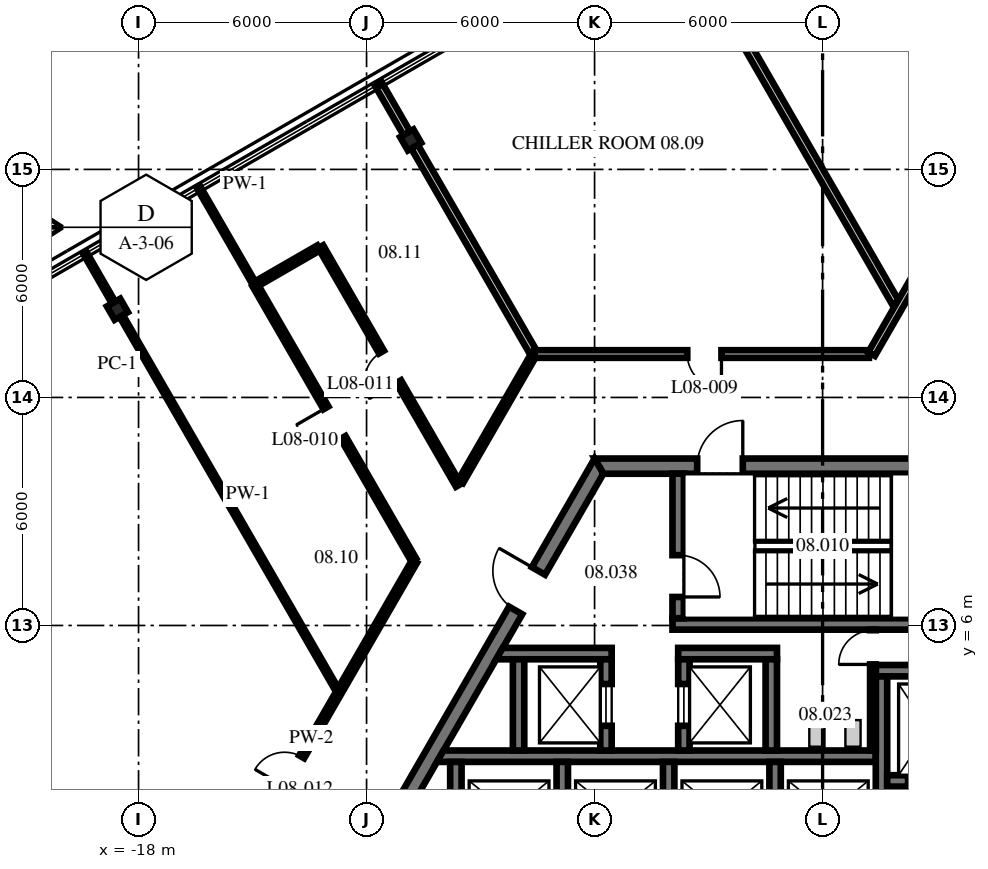
"""IFC4 building model, lengths in metres.
Left out: names, types, materials, properties, quantities, classifications, styles, units other than length and angle.
Written with IfcOpenShell. Run it as: python <this file> out.ifc"""

import sys

from ifc_helpers import new_model, si_unit, direction, frame, frame_2d, origin, origin_2d, place, context, subcontext, project, spatial, polyline, rectangle, i_section, outline, extrude, source, transform, mapped, element, fill, save


model = new_model("IFC4")
c1 = context("Model", 3, precision=1e-05, world=origin(), true_north=direction((0.0, 1.0)))
c2 = subcontext(c1, "Body", "Model", "MODEL_VIEW")
j1 = project(units=[si_unit("LENGTHUNIT", "METRE"), si_unit("PLANEANGLEUNIT", "RADIAN")], contexts=[c1])
p1 = place(None, origin())
s1 = spatial("IfcSite", under=j1, at=p1, CompositionType="ELEMENT")
p2 = place(p1, origin())
s2 = spatial("IfcBuilding", under=s1, at=p2, CompositionType="ELEMENT")
p3 = place(p2, frame((0.0, 0.0, 37.5)))
s3 = spatial("IfcBuildingStorey", under=s2, at=p3, CompositionType="ELEMENT", Elevation=37.5)
m1 = source(origin(), c2, "Body", "SweptSolid", [
    extrude(i_section(OverallWidth=0.404, OverallDepth=0.406, WebThickness=0.027, FlangeThickness=0.044, at=origin_2d()), origin(), (0.0, 0.0, 1.0), 4.3),
])
for number, where, z_axis, x_axis in (
    (1, (-10.84, 18.775, 0.0), (0.0, 0.0, 1.0), (-0.866, -0.5, 0.0)),
    (2, (-18.556, 14.32, 0.0), (0.0, 0.0, 1.0), (-0.866, -0.5, 0.0)),
):
    element("IfcColumn", number, at=place(p3, frame(where, z_axis=z_axis, x_axis=x_axis)), inside=s3, PredefinedType="COLUMN", context=c2, shape_type="MappedRepresentation", body=[
        mapped(m1, transform((0.0, 0.0, 0.0), scale=1.0)),
    ])
m2 = source(origin(), c2, "Body", "SweptSolid", [
    extrude(outline(polyline([(-0.115, -0.2), (11.885, -0.2), (11.654, 0.2), (0.115, 0.2), (-0.115, -0.2)])), origin(), (0.0, 0.0, 1.0), 4.1),
])
p4 = place(p3, frame((5.885, 10.192, 0.0), z_axis=(0.0, 0.0, 1.0), x_axis=(-1.0, 0.0, 0.0)))
e3 = element("IfcWall", 3, at=p4, inside=s3, PredefinedType="SHEAR", context=c2, shape_type="MappedRepresentation", body=[
    mapped(m2, transform((0.0, 0.0, 0.0), scale=1.0)),
])
p5 = place(p4, frame((7.985, 0.0, 0.0)))
e4 = element("IfcOpeningElement", 4, at=p5, cuts=e3, PredefinedType="OPENING", context=c2, shape_type="SweptSolid", body=[
    extrude(rectangle(XDim=1.2, YDim=2.1, at=frame_2d((0.6, 1.05))), frame((0.0, 0.21, 0.0), z_axis=(0.0, -1.0, 0.0), x_axis=(1.0, 0.0, 0.0)), (0.0, 0.0, 1.0), 0.42),
])
p6 = place(p3, frame((-5.885, 10.192, 0.0), z_axis=(0.0, 0.0, 1.0), x_axis=(-0.499996592174, -0.866027371285, 0.0)))
e5 = element("IfcWall", 5, at=p6, inside=s3, PredefinedType="SHEAR", context=c2, shape_type="MappedRepresentation", body=[
    mapped(m2, transform((0.0, 0.0, 0.0), scale=1.0)),
])
p7 = place(p6, frame((3.185, 0.0, 0.0)))
e6 = element("IfcOpeningElement", 6, at=p7, cuts=e5, PredefinedType="OPENING", context=c2, shape_type="SweptSolid", body=[
    extrude(rectangle(XDim=1.2, YDim=2.1, at=frame_2d((0.6, 1.05))), frame((0.0, 0.21, 0.0), z_axis=(0.0, -1.0, 0.0), x_axis=(1.0, 0.0, 0.0)), (0.0, 0.0, 1.0), 0.42),
])
m3 = source(origin(), c2, "Body", "SweptSolid", [
    extrude(outline(polyline([(11.2, -0.15), (-0.349, -0.15), (-0.176, 0.15), (11.2, 0.15), (11.2, -0.15)])), origin(), (0.0, 0.0, 1.0), 4.1),
])
p8 = place(p3, frame((-9.8, 2.56, 0.0), z_axis=(0.0, 0.0, 1.0), x_axis=(1.0, 0.0, 0.0)))
e7 = element("IfcWall", 7, at=p8, inside=s3, PredefinedType="SHEAR", context=c2, shape_type="MappedRepresentation", body=[
    mapped(m3, transform((0.0, 0.0, 0.0), scale=1.0)),
])
m4 = source(origin(), c2, "Body", "SweptSolid", [
    extrude(rectangle(XDim=2.5, YDim=0.3, at=frame_2d((1.25, 0.0))), origin(), (0.0, 0.0, 1.0), 4.1),
])
p9 = place(p3, frame((1.4, 4.81, 0.0), z_axis=(0.0, 0.0, 1.0), x_axis=(1.0, 0.0, 0.0)))
e8 = element("IfcWall", 8, at=p9, inside=s3, PredefinedType="SHEAR", context=c2, shape_type="MappedRepresentation", body=[
    mapped(m4, transform((0.0, 0.0, 0.0), scale=1.0)),
])
m5 = source(origin(), c2, "Body", "SweptSolid", [
    extrude(rectangle(XDim=4.45, YDim=0.3, at=frame_2d((2.225, 0.0))), origin(), (0.0, 0.0, 1.0), 4.1),
])
p10 = place(p3, frame((1.55, 0.21, 0.0), z_axis=(0.0, 0.0, 1.0), x_axis=(0.0, 1.0, 0.0)))
e9 = element("IfcWall", 9, at=p10, inside=s3, PredefinedType="SHEAR", context=c2, shape_type="MappedRepresentation", body=[
    mapped(m5, transform((0.0, 0.0, 0.0), scale=1.0)),
])
m6 = source(origin(), c2, "Body", "SweptSolid", [
    extrude(rectangle(XDim=3.0, YDim=0.3, at=frame_2d((1.5, 0.0))), origin(), (0.0, 0.0, 1.0), 4.1),
])
p11 = place(p3, frame((1.7, 1.91, 0.0), z_axis=(0.0, 0.0, 1.0), x_axis=(1.0, 0.0, 0.0)))
e10 = element("IfcWall", 10, at=p11, inside=s3, PredefinedType="SHEAR", context=c2, shape_type="MappedRepresentation", body=[
    mapped(m6, transform((0.0, 0.0, 0.0), scale=1.0)),
])
p12 = place(p11, frame((0.55, 0.0, 0.0)))
e11 = element("IfcOpeningElement", 11, at=p12, cuts=e10, PredefinedType="OPENING", context=c2, shape_type="SweptSolid", body=[
    extrude(rectangle(XDim=1.1, YDim=2.1, at=frame_2d((0.55, 1.05))), frame((0.0, 0.16, 0.0), z_axis=(0.0, -1.0, 0.0), x_axis=(1.0, 0.0, 0.0)), (0.0, 0.0, 1.0), 0.32),
])
m7 = source(origin(), c2, "Body", "SweptSolid", [
    extrude(rectangle(XDim=2.2, YDim=0.3, at=frame_2d((1.1, 0.0))), origin(), (0.0, 0.0, 1.0), 4.1),
])
p13 = place(p3, frame((-9.65, 0.21, 0.0), z_axis=(0.0, 0.0, 1.0), x_axis=(0.0, 1.0, 0.0)))
e12 = element("IfcWall", 12, at=p13, inside=s3, PredefinedType="SHEAR", context=c2, shape_type="MappedRepresentation", body=[
    mapped(m7, transform((0.0, 0.0, 0.0), scale=1.0)),
])
m8 = source(origin(), c2, "Body", "SweptSolid", [
    extrude(rectangle(XDim=7.9, YDim=0.3, at=frame_2d((3.95, 0.0))), origin(), (0.0, 0.0, 1.0), 4.1),
])
p14 = place(p3, frame((-3.95, 6.04, 0.0), z_axis=(0.0, 0.0, 1.0), x_axis=(1.0, 0.0, 0.0)))
e13 = element("IfcWall", 13, at=p14, inside=s3, PredefinedType="SHEAR", context=c2, shape_type="MappedRepresentation", body=[
    mapped(m8, transform((0.0, 0.0, 0.0), scale=1.0)),
])
m9 = source(origin(), c2, "Body", "SweptSolid", [
    extrude(outline(polyline([(0.0, -0.15), (0.0, 0.15), (3.804, 0.15), (3.804, -0.15), (0.0, -0.15)])), origin(), (0.0, 0.0, 1.0), 4.1),
])
p15 = place(p3, frame((-3.8, 6.19, 0.0), z_axis=(0.0, 0.0, 1.0), x_axis=(0.0, 1.0, 0.0)))
e14 = element("IfcWall", 14, at=p15, inside=s3, PredefinedType="SHEAR", context=c2, shape_type="MappedRepresentation", body=[
    mapped(m9, transform((0.0, 0.0, 0.0), scale=1.0)),
])
p16 = place(p15, frame((0.56, 0.0, 0.0)))
e15 = element("IfcOpeningElement", 15, at=p16, cuts=e14, PredefinedType="OPENING", context=c2, shape_type="SweptSolid", body=[
    extrude(rectangle(XDim=1.1, YDim=2.1, at=frame_2d((0.55, 1.05))), frame((0.0, 0.16, 0.0), z_axis=(0.0, -1.0, 0.0), x_axis=(1.0, 0.0, 0.0)), (0.0, 0.0, 1.0), 0.32),
])
m10 = source(origin(), c2, "Body", "SweptSolid", [
    extrude(outline(polyline([(2.6, -0.15), (-0.44, -0.15), (-0.267, 0.15), (2.6, 0.15), (2.6, -0.15)])), origin(), (0.0, 0.0, 1.0), 4.1),
])
p17 = place(p3, frame((-8.15, 5.26, 0.0), z_axis=(0.0, 0.0, 1.0), x_axis=(1.0, 0.0, 0.0)))
e16 = element("IfcWall", 16, at=p17, inside=s3, PredefinedType="SHEAR", context=c2, shape_type="MappedRepresentation", body=[
    mapped(m10, transform((0.0, 0.0, 0.0), scale=1.0)),
])
m11 = source(origin(), c2, "Body", "SweptSolid", [
    extrude(rectangle(XDim=2.4, YDim=0.3, at=frame_2d((1.2, 0.0))), origin(), (0.0, 0.0, 1.0), 4.1),
])
p18 = place(p3, frame((-8.0, 2.71, 0.0), z_axis=(0.0, 0.0, 1.0), x_axis=(0.0, 1.0, 0.0)))
e17 = element("IfcWall", 17, at=p18, inside=s3, PredefinedType="SHEAR", context=c2, shape_type="MappedRepresentation", body=[
    mapped(m11, transform((0.0, 0.0, 0.0), scale=1.0)),
])
p19 = place(p3, frame((-5.7, 2.71, 0.0), z_axis=(0.0, 0.0, 1.0), x_axis=(0.0, 1.0, 0.0)))
e18 = element("IfcWall", 18, at=p19, inside=s3, PredefinedType="SHEAR", context=c2, shape_type="MappedRepresentation", body=[
    mapped(m11, transform((0.0, 0.0, 0.0), scale=1.0)),
])
p20 = place(p19, frame((0.65, 0.0, 0.0)))
e19 = element("IfcOpeningElement", 19, at=p20, cuts=e18, PredefinedType="OPENING", context=c2, shape_type="SweptSolid", body=[
    extrude(rectangle(XDim=1.1, YDim=2.1, at=frame_2d((0.55, 1.05))), frame((0.0, 0.16, 0.0), z_axis=(0.0, -1.0, 0.0), x_axis=(1.0, 0.0, 0.0)), (0.0, 0.0, 1.0), 0.32),
])
m12 = source(origin(), c2, "Body", "SweptSolid", [
    extrude(rectangle(XDim=2.6, YDim=0.3, at=frame_2d((1.3, 0.0))), origin(), (0.0, 0.0, 1.0), 4.1),
])
p21 = place(p3, frame((-3.8, 5.26, 0.0), z_axis=(0.0, 0.0, 1.0), x_axis=(1.0, 0.0, 0.0)))
e20 = element("IfcWall", 20, at=p21, inside=s3, PredefinedType="SHEAR", context=c2, shape_type="MappedRepresentation", body=[
    mapped(m12, transform((0.0, 0.0, 0.0), scale=1.0)),
])
p22 = place(p3, frame((-3.65, 2.71, 0.0), z_axis=(0.0, 0.0, 1.0), x_axis=(0.0, 1.0, 0.0)))
e21 = element("IfcWall", 21, at=p22, inside=s3, PredefinedType="SHEAR", context=c2, shape_type="MappedRepresentation", body=[
    mapped(m11, transform((0.0, 0.0, 0.0), scale=1.0)),
])
p23 = place(p22, frame((0.65, 0.0, 0.0)))
e22 = element("IfcOpeningElement", 22, at=p23, cuts=e21, PredefinedType="OPENING", context=c2, shape_type="SweptSolid", body=[
    extrude(rectangle(XDim=1.1, YDim=2.1, at=frame_2d((0.55, 1.05))), frame((0.0, 0.16, 0.0), z_axis=(0.0, -1.0, 0.0), x_axis=(1.0, 0.0, 0.0)), (0.0, 0.0, 1.0), 0.32),
])
p24 = place(p3, frame((-1.35, 2.71, 0.0), z_axis=(0.0, 0.0, 1.0), x_axis=(0.0, 1.0, 0.0)))
e23 = element("IfcWall", 23, at=p24, inside=s3, PredefinedType="SHEAR", context=c2, shape_type="MappedRepresentation", body=[
    mapped(m11, transform((0.0, 0.0, 0.0), scale=1.0)),
])
m13 = source(origin(), c2, "Body", "SweptSolid", [
    extrude(rectangle(XDim=3.18, YDim=0.15, at=frame_2d((1.59, 0.0))), origin(), (0.0, 0.0, 1.0), 4.1),
])
p25 = place(p3, frame((1.325, 2.71, 0.0), z_axis=(0.0, 0.0, 1.0), x_axis=(0.0, 1.0, 0.0)))
e24 = element("IfcWall", 24, at=p25, inside=s3, PredefinedType="PARTITIONING", context=c2, shape_type="MappedRepresentation", body=[
    mapped(m13, transform((0.0, 0.0, 0.0), scale=1.0)),
])
p26 = place(p25, frame((2.265, 0.0, 0.0)))
e25 = element("IfcOpeningElement", 25, at=p26, cuts=e24, PredefinedType="OPENING", context=c2, shape_type="SweptSolid", body=[
    extrude(rectangle(XDim=0.9, YDim=2.1, at=frame_2d((0.45, 1.05))), frame((0.0, 0.085, 0.0), z_axis=(0.0, -1.0, 0.0), x_axis=(1.0, 0.0, 0.0)), (0.0, 0.0, 1.0), 0.17),
])
for number, where, z_axis, x_axis in (
    (26, (-6.85, 0.21, 0.0), (0.0, 0.0, 1.0), (0.0, 1.0, 0.0)),
    (27, (-4.05, 0.21, 0.0), (0.0, 0.0, 1.0), (0.0, 1.0, 0.0)),
    (28, (-1.25, 0.21, 0.0), (0.0, 0.0, 1.0), (0.0, 1.0, 0.0)),
):
    element("IfcWall", number, at=place(p3, frame(where, z_axis=z_axis, x_axis=x_axis)), inside=s3, PredefinedType="SHEAR", context=c2, shape_type="MappedRepresentation", body=[
        mapped(m7, transform((0.0, 0.0, 0.0), scale=1.0)),
    ])
m14 = source(origin(), c2, "Body", "SweptSolid", [
    extrude(rectangle(XDim=1.499, YDim=0.1, at=frame_2d((0.749, 0.0))), origin(), (0.0, 0.0, 1.0), 4.1),
])
p27 = place(p3, frame((-19.402, 15.785, 0.0), z_axis=(0.0, 0.0, 1.0), x_axis=(0.499976292358, -0.866039090965, 0.0)))
e29 = element("IfcWall", 29, at=p27, inside=s3, PredefinedType="PARTITIONING", context=c2, shape_type="MappedRepresentation", body=[
    mapped(m14, transform((0.0, 0.0, 0.0), scale=1.0)),
])
m15 = source(origin(), c2, "Body", "SweptSolid", [
    extrude(rectangle(XDim=11.455, YDim=0.1, at=frame_2d((5.728, 0.0))), origin(), (0.0, 0.0, 1.0), 3.343),
])
p28 = place(p3, frame((-18.459, 14.153, 0.0), z_axis=(0.0, 0.0, 1.0), x_axis=(0.500008416231, -0.866020544617, 0.0)))
e30 = element("IfcWall", 30, at=p28, inside=s3, PredefinedType="PARTITIONING", context=c2, shape_type="MappedRepresentation", body=[
    mapped(m15, transform((0.0, 0.0, 0.0), scale=1.0)),
])
p29 = place(p3, frame((-16.41, 17.513, 0.0), z_axis=(0.0, 0.0, 1.0), x_axis=(0.500041054325, -0.866001699761, 0.0)))
e31 = element("IfcWall", 31, at=p29, inside=s3, PredefinedType="PARTITIONING", context=c2, shape_type="SweptSolid", body=[
    extrude(rectangle(XDim=2.941, YDim=0.1, at=frame_2d((1.47, 0.0))), origin(), (0.0, 0.0, 1.0), 4.1),
])
p30 = place(p3, frame((-14.939, 14.965, 0.0), z_axis=(0.0, 0.0, 1.0), x_axis=(0.499977133552, -0.866038605332, 0.0)))
e32 = element("IfcWall", 32, at=p30, inside=s3, PredefinedType="PARTITIONING", context=c2, shape_type="SweptSolid", body=[
    extrude(rectangle(XDim=8.354, YDim=0.15, at=frame_2d((4.177, 0.0))), origin(), (0.0, 0.0, 1.0), 4.1),
])
p31 = place(p30, frame((3.74, 0.0, 0.0)))
e33 = element("IfcOpeningElement", 33, at=p31, cuts=e32, PredefinedType="OPENING", context=c2, shape_type="SweptSolid", body=[
    extrude(rectangle(XDim=0.9, YDim=2.1, at=frame_2d((0.45, 1.05))), frame((0.0, 0.085, 0.0), z_axis=(0.0, -1.0, 0.0), x_axis=(1.0, 0.0, 0.0)), (0.0, 0.0, 1.0), 0.17),
])
m16 = source(origin(), c2, "Body", "SweptSolid", [
    extrude(rectangle(XDim=7.249, YDim=0.15, at=frame_2d((3.625, 0.0))), origin(), (0.0, 0.0, 1.0), 4.1),
])
p32 = place(p3, frame((-13.207, 15.965, 0.0), z_axis=(0.0, 0.0, 1.0), x_axis=(0.500014967241, -0.866016762271, 0.0)))
e34 = element("IfcWall", 34, at=p32, inside=s3, PredefinedType="PARTITIONING", context=c2, shape_type="MappedRepresentation", body=[
    mapped(m16, transform((0.0, 0.0, 0.0), scale=1.0)),
])
p33 = place(p32, frame((3.199, 0.0, 0.0)))
e35 = element("IfcOpeningElement", 35, at=p33, cuts=e34, PredefinedType="OPENING", context=c2, shape_type="SweptSolid", body=[
    extrude(rectangle(XDim=0.9, YDim=2.1, at=frame_2d((0.45, 1.05))), frame((0.0, 0.085, 0.0), z_axis=(0.0, -1.0, 0.0), x_axis=(1.0, 0.0, 0.0)), (0.0, 0.0, 1.0), 0.17),
])
m17 = source(origin(), c2, "Body", "SweptSolid", [
    extrude(rectangle(XDim=1.499, YDim=0.2, at=frame_2d((0.749, 0.0))), origin(), (0.0, 0.0, 1.0), 4.1),
])
p34 = place(p3, frame((-11.686, 20.24, 0.0), z_axis=(0.0, 0.0, 1.0), x_axis=(0.499976292358, -0.866039090965, 0.0)))
e36 = element("IfcWall", 36, at=p34, inside=s3, PredefinedType="PARTITIONING", context=c2, shape_type="MappedRepresentation", body=[
    mapped(m17, transform((0.0, 0.0, 0.0), scale=1.0)),
])
m18 = source(origin(), c2, "Body", "SweptSolid", [
    extrude(rectangle(XDim=6.241, YDim=0.2, at=frame_2d((3.121, 0.0))), origin(), (0.0, 0.0, 1.0), 3.488),
])
p35 = place(p3, frame((-10.743, 18.608, 0.0), z_axis=(0.0, 0.0, 1.0), x_axis=(0.499988843237, -0.866031845049, 0.0)))
e37 = element("IfcWall", 37, at=p35, inside=s3, PredefinedType="PARTITIONING", context=c2, shape_type="MappedRepresentation", body=[
    mapped(m18, transform((0.0, 0.0, 0.0), scale=1.0)),
])
m19 = source(origin(), c2, "Body", "SweptSolid", [
    extrude(rectangle(XDim=9.893, YDim=0.2, at=frame_2d((4.947, 0.0))), origin(), (0.0, 0.0, 1.0), 3.343),
])
p36 = place(p3, frame((-3.027, 23.063, 0.0), z_axis=(0.0, 0.0, 1.0), x_axis=(0.499990184253, -0.866031070834, 0.0)))
e38 = element("IfcWall", 38, at=p36, inside=s3, PredefinedType="PARTITIONING", context=c2, shape_type="MappedRepresentation", body=[
    mapped(m19, transform((0.0, 0.0, 0.0), scale=1.0)),
])
p37 = place(p3, frame((-7.588, 13.142, 0.0), z_axis=(0.0, 0.0, 1.0), x_axis=(1.0, 0.0, 0.0)))
e39 = element("IfcWall", 39, at=p37, inside=s3, PredefinedType="PARTITIONING", context=c2, shape_type="SweptSolid", body=[
    extrude(rectangle(XDim=8.807, YDim=0.2, at=frame_2d((4.403, 0.0))), origin(), (0.0, 0.0, 1.0), 4.1),
])
p38 = place(p37, frame((4.027, 0.0, 0.0)))
e40 = element("IfcOpeningElement", 40, at=p38, cuts=e39, PredefinedType="OPENING", context=c2, shape_type="SweptSolid", body=[
    extrude(rectangle(XDim=0.9, YDim=2.1, at=frame_2d((0.45, 1.05))), frame((0.0, 0.11, 0.0), z_axis=(0.0, -1.0, 0.0), x_axis=(1.0, 0.0, 0.0)), (0.0, 0.0, 1.0), 0.22),
])
m20 = source(origin(), c2, "Body", "SweptSolid", [
    extrude(rectangle(XDim=1.89, YDim=0.15, at=frame_2d((0.945, 0.0))), origin(), (0.0, 0.0, 1.0), 4.1),
])
p39 = place(p3, frame((-14.896, 14.991, 0.0), z_axis=(0.0, 0.0, 1.0), x_axis=(0.866000578957, 0.500042995397, 0.0)))
e41 = element("IfcWall", 41, at=p39, inside=s3, PredefinedType="PARTITIONING", context=c2, shape_type="MappedRepresentation", body=[
    mapped(m20, transform((0.0, 0.0, 0.0), scale=1.0)),
])
p40 = place(p3, frame((1.289, 13.142, 0.0), z_axis=(0.0, 0.0, 1.0), x_axis=(0.499995716753, 0.866027876704, 0.0)))
e42 = element("IfcWall", 42, at=p40, inside=s3, PredefinedType="PARTITIONING", context=c2, shape_type="SweptSolid", body=[
    extrude(rectangle(XDim=11.704, YDim=0.2, at=frame_2d((5.852, 0.0))), origin(), (0.0, 0.0, 1.0), 4.1),
])
p41 = place(p40, frame((6.05, 0.0, 0.0)))
e43 = element("IfcOpeningElement", 43, at=p41, cuts=e42, PredefinedType="OPENING", context=c2, shape_type="SweptSolid", body=[
    extrude(rectangle(XDim=1.0, YDim=2.1, at=frame_2d((0.5, 1.05))), frame((0.0, 0.11, 0.0), z_axis=(0.0, -1.0, 0.0), x_axis=(1.0, 0.0, 0.0)), (0.0, 0.0, 1.0), 0.22),
])
p42 = place(p3, frame((-15.175, 0.0, 0.0), z_axis=(0.0, 0.0, 1.0), x_axis=(0.499999423938, 0.866025736374, 0.0)))
e44 = element("IfcWall", 44, at=p42, inside=s3, PredefinedType="PARTITIONING", context=c2, shape_type="SweptSolid", body=[
    extrude(rectangle(XDim=8.876, YDim=0.15, at=frame_2d((4.438, 0.0))), origin(), (0.0, 0.0, 1.0), 4.1),
])
p43 = place(p42, frame((2.037, 0.0, 0.0)))
e45 = element("IfcOpeningElement", 45, at=p43, cuts=e44, PredefinedType="OPENING", context=c2, shape_type="SweptSolid", body=[
    extrude(rectangle(XDim=0.9, YDim=2.1, at=frame_2d((0.45, 1.05))), frame((0.0, 0.085, 0.0), z_axis=(0.0, -1.0, 0.0), x_axis=(1.0, 0.0, 0.0)), (0.0, 0.0, 1.0), 0.17),
])
p44 = place(p3, frame((-9.527, 9.783, 0.0), z_axis=(0.0, 0.0, 1.0), x_axis=(0.50001277644, 0.866018027177, 0.0)))
e46 = element("IfcWall", 46, at=p44, inside=s3, PredefinedType="PARTITIONING", context=c2, shape_type="SweptSolid", body=[
    extrude(rectangle(XDim=3.81, YDim=0.15, at=frame_2d((1.905, 0.0))), origin(), (0.0, 0.0, 1.0), 4.1),
])
p45 = place(p5, frame((1.2, 0.0, 0.0), z_axis=(0.0, 0.0, 1.0), x_axis=(-1.0, 0.0, 0.0)))
e47 = element("IfcDoor", 47, at=p45, inside=s3, OperationType="SINGLE_SWING_RIGHT", PredefinedType="DOOR", context=c2, shape_type="SweptSolid", body=[
    extrude(rectangle(XDim=1.2, YDim=2.1, at=frame_2d((0.6, 1.05))), frame((0.0, 0.025, 0.0), z_axis=(0.0, -1.0, 0.0), x_axis=(1.0, 0.0, 0.0)), (0.0, 0.0, 1.0), 0.05),
])
fill(e4, e47)
p46 = place(p7, frame((1.2, 0.0, 0.0), z_axis=(0.0, 0.0, 1.0), x_axis=(-1.0, 0.0, 0.0)))
e48 = element("IfcDoor", 48, at=p46, inside=s3, OperationType="SINGLE_SWING_RIGHT", PredefinedType="DOOR", context=c2, shape_type="SweptSolid", body=[
    extrude(rectangle(XDim=1.2, YDim=2.1, at=frame_2d((0.6, 1.05))), frame((0.0, 0.025, 0.0), z_axis=(0.0, -1.0, 0.0), x_axis=(1.0, 0.0, 0.0)), (0.0, 0.0, 1.0), 0.05),
])
fill(e6, e48)
p47 = place(p16, frame((1.1, 0.0, 0.0), z_axis=(0.0, 0.0, 1.0), x_axis=(-1.0, 0.0, 0.0)))
e49 = element("IfcDoor", 49, at=p47, inside=s3, OperationType="SINGLE_SWING_RIGHT", PredefinedType="DOOR", context=c2, shape_type="SweptSolid", body=[
    extrude(rectangle(XDim=1.1, YDim=2.1, at=frame_2d((0.55, 1.05))), frame((0.0, 0.025, 0.0), z_axis=(0.0, -1.0, 0.0), x_axis=(1.0, 0.0, 0.0)), (0.0, 0.0, 1.0), 0.05),
])
fill(e15, e49)
p48 = place(p26, origin())
e50 = element("IfcDoor", 50, at=p48, inside=s3, OperationType="SINGLE_SWING_LEFT", PredefinedType="DOOR", context=c2, shape_type="SweptSolid", body=[
    extrude(rectangle(XDim=0.9, YDim=2.1, at=frame_2d((0.45, 1.05))), frame((0.0, 0.025, 0.0), z_axis=(0.0, -1.0, 0.0), x_axis=(1.0, 0.0, 0.0)), (0.0, 0.0, 1.0), 0.05),
])
fill(e25, e50)
p49 = place(p20, origin())
e51 = element("IfcDoor", 51, at=p49, inside=s3, OperationType="DOUBLE_DOOR_SLIDING", PredefinedType="DOOR", context=c2, shape_type="SweptSolid", body=[
    extrude(rectangle(XDim=1.1, YDim=2.1, at=frame_2d((0.55, 1.05))), frame((0.0, 0.025, 0.0), z_axis=(0.0, -1.0, 0.0), x_axis=(1.0, 0.0, 0.0)), (0.0, 0.0, 1.0), 0.05),
])
fill(e19, e51)
p50 = place(p23, origin())
e52 = element("IfcDoor", 52, at=p50, inside=s3, OperationType="DOUBLE_DOOR_SLIDING", PredefinedType="DOOR", context=c2, shape_type="SweptSolid", body=[
    extrude(rectangle(XDim=1.1, YDim=2.1, at=frame_2d((0.55, 1.05))), frame((0.0, 0.025, 0.0), z_axis=(0.0, -1.0, 0.0), x_axis=(1.0, 0.0, 0.0)), (0.0, 0.0, 1.0), 0.05),
])
fill(e22, e52)
p51 = place(p38, origin())
e53 = element("IfcDoor", 53, at=p51, inside=s3, OperationType="SINGLE_SWING_RIGHT", PredefinedType="DOOR", context=c2, shape_type="SweptSolid", body=[
    extrude(rectangle(XDim=0.9, YDim=2.1, at=frame_2d((0.45, 1.05))), frame((0.0, 0.025, 0.0), z_axis=(0.0, -1.0, 0.0), x_axis=(1.0, 0.0, 0.0)), (0.0, 0.0, 1.0), 0.05),
])
fill(e40, e53)
p52 = place(p31, origin())
e54 = element("IfcDoor", 54, at=p52, inside=s3, OperationType="SINGLE_SWING_RIGHT", PredefinedType="DOOR", context=c2, shape_type="SweptSolid", body=[
    extrude(rectangle(XDim=0.9, YDim=2.1, at=frame_2d((0.45, 1.05))), frame((0.0, 0.025, 0.0), z_axis=(0.0, -1.0, 0.0), x_axis=(1.0, 0.0, 0.0)), (0.0, 0.0, 1.0), 0.05),
])
fill(e33, e54)
p53 = place(p33, origin())
e55 = element("IfcDoor", 55, at=p53, inside=s3, OperationType="SINGLE_SWING_RIGHT", PredefinedType="DOOR", context=c2, shape_type="SweptSolid", body=[
    extrude(rectangle(XDim=0.9, YDim=2.1, at=frame_2d((0.45, 1.05))), frame((0.0, 0.025, 0.0), z_axis=(0.0, -1.0, 0.0), x_axis=(1.0, 0.0, 0.0)), (0.0, 0.0, 1.0), 0.05),
])
fill(e35, e55)
p54 = place(p43, origin())
e56 = element("IfcDoor", 56, at=p54, inside=s3, OperationType="SINGLE_SWING_LEFT", PredefinedType="DOOR", context=c2, shape_type="SweptSolid", body=[
    extrude(rectangle(XDim=0.9, YDim=2.1, at=frame_2d((0.45, 1.05))), frame((0.0, 0.025, 0.0), z_axis=(0.0, -1.0, 0.0), x_axis=(1.0, 0.0, 0.0)), (0.0, 0.0, 1.0), 0.05),
])
fill(e45, e56)
save(model, sys.argv[1])
